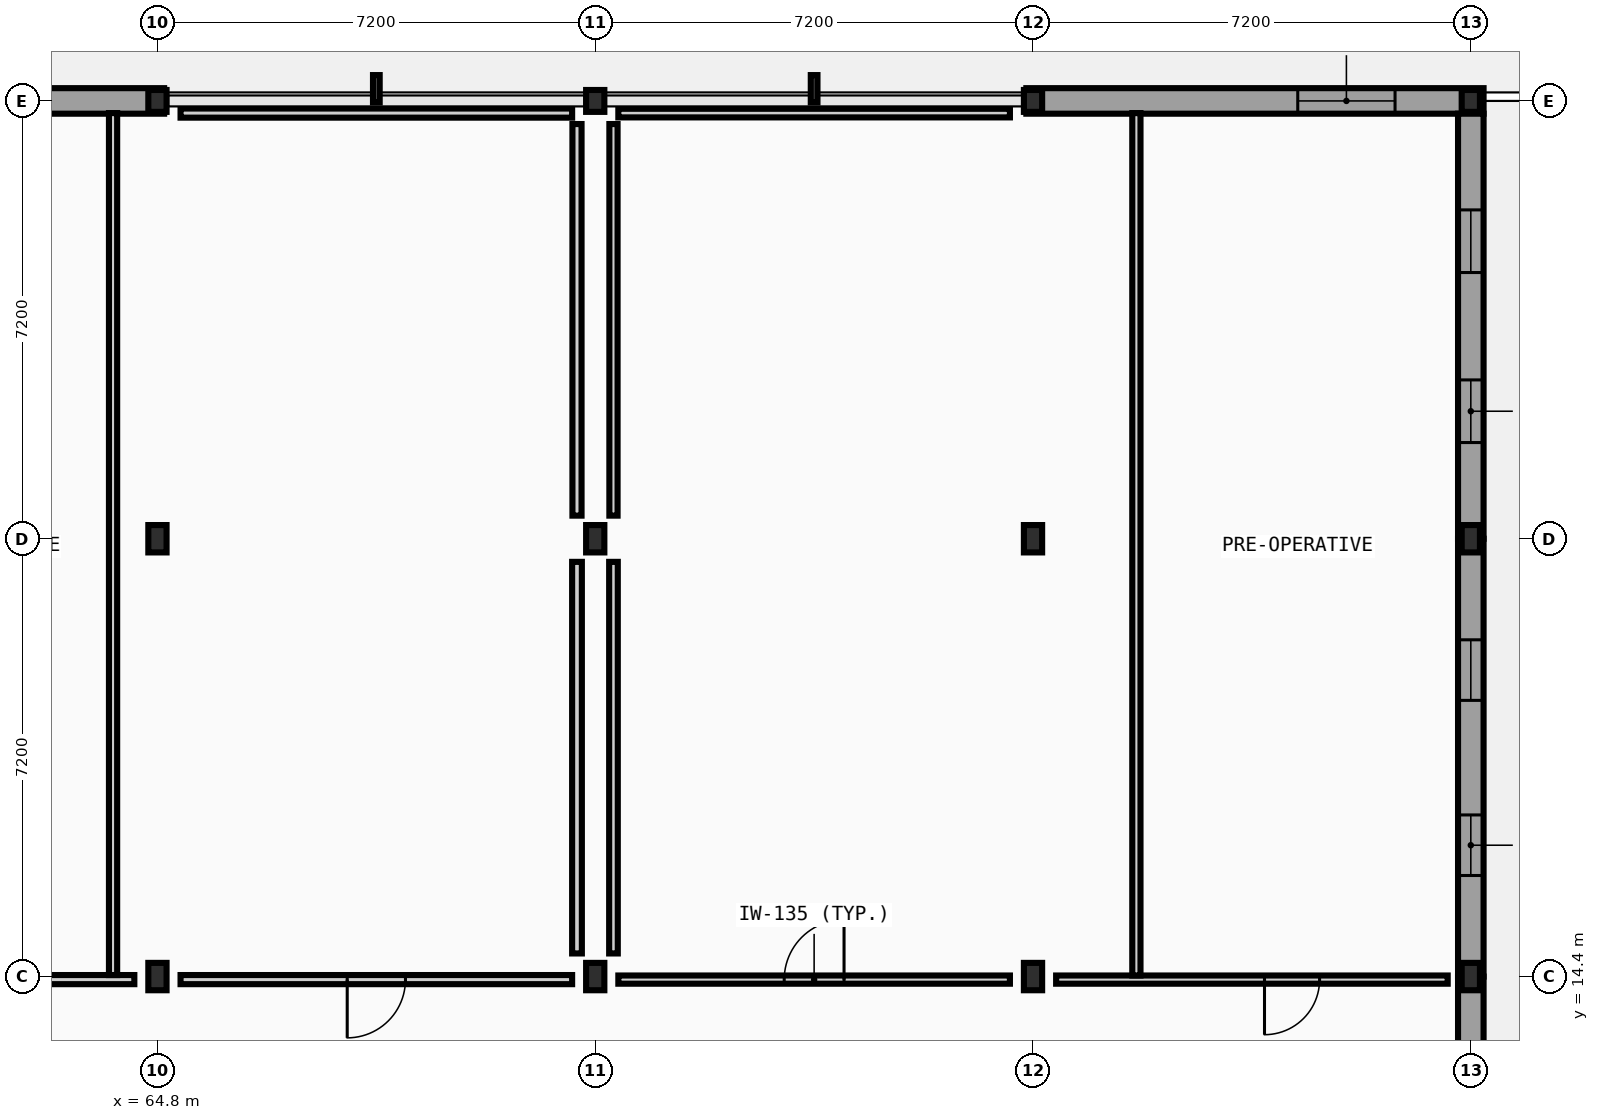
"""IFC4 building model, lengths in metres.
Left out: names, types, materials, properties, quantities, classifications, styles, units other than length and angle.
Written with IfcOpenShell. Run it as: python <this file> out.ifc"""

import sys

from ifc_helpers import new_model, si_unit, direction, frame, frame_2d, origin, origin_2d, place, context, subcontext, project, spatial, rectangle, i_section, extrude, element, fill, save


model = new_model("IFC4")
c1 = context("Model", 3, precision=1e-05, world=origin(), true_north=direction((0.0, 1.0)))
c2 = subcontext(c1, "Body", "Model", "MODEL_VIEW")
j1 = project(units=[si_unit("LENGTHUNIT", "METRE"), si_unit("PLANEANGLEUNIT", "RADIAN")], contexts=[c1])
p1 = place(None, origin())
s1 = spatial("IfcSite", under=j1, at=p1, CompositionType="ELEMENT")
p2 = place(p1, origin())
s2 = spatial("IfcBuilding", under=s1, at=p2, CompositionType="ELEMENT")
p3 = place(p2, origin())
s3 = spatial("IfcBuildingStorey", under=s2, at=p3, CompositionType="ELEMENT", Elevation=0.0)
for number, where, z_axis, x_axis in (
    (1, (64.8, 14.4, 0.0), (0.0, 0.0, 1.0), (1.0, 0.0, 0.0)),
    (2, (64.8, 21.6, 0.0), (0.0, 0.0, 1.0), (1.0, 0.0, 0.0)),
):
    element("IfcColumn", number, at=place(p3, frame(where, z_axis=z_axis, x_axis=x_axis)), inside=s3, PredefinedType="COLUMN", context=c2, shape_type="SweptSolid", body=[
        extrude(i_section(OverallWidth=0.3, OverallDepth=0.45, WebThickness=0.014, FlangeThickness=0.026, FilletRadius=0.027, at=origin_2d()), origin(), (0.0, 0.0, 1.0), 5.2),
    ])
p4 = place(p3, frame((64.8, 28.8, 0.0), z_axis=(0.0, 0.0, 1.0), x_axis=(1.0, 0.0, 0.0)))
e3 = element("IfcColumn", 3, at=p4, inside=s3, PredefinedType="COLUMN", context=c2, shape_type="SweptSolid", body=[
    extrude(i_section(OverallWidth=0.3, OverallDepth=0.36, WebThickness=0.012, FlangeThickness=0.022, FilletRadius=0.027, at=origin_2d()), origin(), (0.0, 0.0, 1.0), 5.2),
])
for number, where, z_axis, x_axis in (
    (4, (72.0, 14.4, 0.0), (0.0, 0.0, 1.0), (1.0, 0.0, 0.0)),
    (5, (72.0, 21.6, 0.0), (0.0, 0.0, 1.0), (1.0, 0.0, 0.0)),
):
    element("IfcColumn", number, at=place(p3, frame(where, z_axis=z_axis, x_axis=x_axis)), inside=s3, PredefinedType="COLUMN", context=c2, shape_type="SweptSolid", body=[
        extrude(i_section(OverallWidth=0.3, OverallDepth=0.45, WebThickness=0.014, FlangeThickness=0.026, FilletRadius=0.027, at=origin_2d()), origin(), (0.0, 0.0, 1.0), 5.2),
    ])
p5 = place(p3, frame((72.0, 28.8, 0.0), z_axis=(0.0, 0.0, 1.0), x_axis=(1.0, 0.0, 0.0)))
e6 = element("IfcColumn", 6, at=p5, inside=s3, PredefinedType="COLUMN", context=c2, shape_type="SweptSolid", body=[
    extrude(i_section(OverallWidth=0.3, OverallDepth=0.36, WebThickness=0.012, FlangeThickness=0.022, FilletRadius=0.027, at=origin_2d()), origin(), (0.0, 0.0, 1.0), 5.2),
])
for number, where, z_axis, x_axis in (
    (7, (79.2, 14.4, 0.0), (0.0, 0.0, 1.0), (1.0, 0.0, 0.0)),
    (8, (79.2, 21.6, 0.0), (0.0, 0.0, 1.0), (1.0, 0.0, 0.0)),
):
    element("IfcColumn", number, at=place(p3, frame(where, z_axis=z_axis, x_axis=x_axis)), inside=s3, PredefinedType="COLUMN", context=c2, shape_type="SweptSolid", body=[
        extrude(i_section(OverallWidth=0.3, OverallDepth=0.45, WebThickness=0.014, FlangeThickness=0.026, FilletRadius=0.027, at=origin_2d()), origin(), (0.0, 0.0, 1.0), 5.2),
    ])
p6 = place(p3, frame((79.2, 28.8, 0.0), z_axis=(0.0, 0.0, 1.0), x_axis=(1.0, 0.0, 0.0)))
e9 = element("IfcColumn", 9, at=p6, inside=s3, PredefinedType="COLUMN", context=c2, shape_type="SweptSolid", body=[
    extrude(i_section(OverallWidth=0.3, OverallDepth=0.36, WebThickness=0.012, FlangeThickness=0.022, FilletRadius=0.027, at=origin_2d()), origin(), (0.0, 0.0, 1.0), 5.2),
])
for number, where, z_axis, x_axis in (
    (10, (86.4, 14.4, 0.0), (0.0, 0.0, 1.0), (1.0, 0.0, 0.0)),
    (11, (86.4, 21.6, 0.0), (0.0, 0.0, 1.0), (1.0, 0.0, 0.0)),
):
    element("IfcColumn", number, at=place(p3, frame(where, z_axis=z_axis, x_axis=x_axis)), inside=s3, PredefinedType="COLUMN", context=c2, shape_type="SweptSolid", body=[
        extrude(i_section(OverallWidth=0.3, OverallDepth=0.45, WebThickness=0.014, FlangeThickness=0.026, FilletRadius=0.027, at=origin_2d()), origin(), (0.0, 0.0, 1.0), 5.2),
    ])
p7 = place(p3, frame((86.4, 28.8, 0.0), z_axis=(0.0, 0.0, 1.0), x_axis=(1.0, 0.0, 0.0)))
e12 = element("IfcColumn", 12, at=p7, inside=s3, PredefinedType="COLUMN", context=c2, shape_type="SweptSolid", body=[
    extrude(i_section(OverallWidth=0.3, OverallDepth=0.36, WebThickness=0.012, FlangeThickness=0.022, FilletRadius=0.027, at=origin_2d()), origin(), (0.0, 0.0, 1.0), 5.2),
])
p8 = place(p3, frame((64.91, 28.8, 0.0), z_axis=(0.0, 0.0, 1.0), x_axis=(-1.0, 0.0, 0.0)))
e13 = element("IfcWall", 13, at=p8, inside=s3, PredefinedType="STANDARD", context=c2, shape_type="SweptSolid", body=[
    extrude(rectangle(XDim=6.38, YDim=0.42, at=frame_2d((3.19, 0.0))), origin(), (0.0, 0.0, 1.0), 4.665),
])
p9 = place(p3, frame((86.61, 28.8, 0.0), z_axis=(0.0, 0.0, 1.0), x_axis=(-1.0, 0.0, 0.0)))
e14 = element("IfcWall", 14, at=p9, inside=s3, PredefinedType="STANDARD", context=c2, shape_type="SweptSolid", body=[
    extrude(rectangle(XDim=7.52, YDim=0.42, at=frame_2d((3.76, 0.0))), origin(), (0.0, 0.0, 1.0), 4.665),
])
p10 = place(p9, frame((1.456, 0.0, 1.2)))
e15 = element("IfcOpeningElement", 15, at=p10, cuts=e14, PredefinedType="OPENING", context=c2, shape_type="SweptSolid", body=[
    extrude(rectangle(XDim=1.6, YDim=1.4, at=frame_2d((0.8, 0.7))), frame((0.0, 0.22, 0.0), z_axis=(0.0, -1.0, 0.0), x_axis=(1.0, 0.0, 0.0)), (0.0, 0.0, 1.0), 0.44),
])
p11 = place(p3, frame((86.4, 8.9, 0.0), z_axis=(0.0, 0.0, 1.0), x_axis=(0.0, 1.0, 0.0)))
e16 = element("IfcWall", 16, at=p11, inside=s3, PredefinedType="STANDARD", context=c2, shape_type="SweptSolid", body=[
    extrude(rectangle(XDim=5.5, YDim=0.42, at=frame_2d((2.75, 0.0))), origin(), (0.0, 0.0, 1.0), 4.97),
])
p12 = place(p3, frame((86.4, 14.4, 0.0), z_axis=(0.0, 0.0, 1.0), x_axis=(0.0, 1.0, 0.0)))
e17 = element("IfcWall", 17, at=p12, inside=s3, PredefinedType="STANDARD", context=c2, shape_type="SweptSolid", body=[
    extrude(rectangle(XDim=7.2, YDim=0.42, at=frame_2d((3.6, 0.0))), origin(), (0.0, 0.0, 1.0), 4.595),
])
p13 = place(p12, frame((1.662, 0.0, 0.95)))
e18 = element("IfcOpeningElement", 18, at=p13, cuts=e17, PredefinedType="OPENING", context=c2, shape_type="SweptSolid", body=[
    extrude(rectangle(XDim=0.996, YDim=1.26, at=frame_2d((0.498, 0.63))), frame((0.0, 0.22, 0.0), z_axis=(0.0, -1.0, 0.0), x_axis=(1.0, 0.0, 0.0)), (0.0, 0.0, 1.0), 0.44),
])
p14 = place(p12, frame((4.542, 0.0, 0.95)))
e19 = element("IfcOpeningElement", 19, at=p14, cuts=e17, PredefinedType="OPENING", context=c2, shape_type="SweptSolid", body=[
    extrude(rectangle(XDim=0.996, YDim=1.26, at=frame_2d((0.498, 0.63))), frame((0.0, 0.22, 0.0), z_axis=(0.0, -1.0, 0.0), x_axis=(1.0, 0.0, 0.0)), (0.0, 0.0, 1.0), 0.44),
])
p15 = place(p3, frame((86.4, 21.6, 0.0), z_axis=(0.0, 0.0, 1.0), x_axis=(0.0, 1.0, 0.0)))
e20 = element("IfcWall", 20, at=p15, inside=s3, PredefinedType="STANDARD", context=c2, shape_type="SweptSolid", body=[
    extrude(rectangle(XDim=6.99, YDim=0.42, at=frame_2d((3.495, 0.0))), origin(), (0.0, 0.0, 1.0), 4.595),
])
p16 = place(p15, frame((1.582, 0.0, 0.95)))
e21 = element("IfcOpeningElement", 21, at=p16, cuts=e20, PredefinedType="OPENING", context=c2, shape_type="SweptSolid", body=[
    extrude(rectangle(XDim=1.03, YDim=1.26, at=frame_2d((0.515, 0.63))), frame((0.0, 0.22, 0.0), z_axis=(0.0, -1.0, 0.0), x_axis=(1.0, 0.0, 0.0)), (0.0, 0.0, 1.0), 0.44),
])
p17 = place(p15, frame((4.378, 0.0, 0.95)))
e22 = element("IfcOpeningElement", 22, at=p17, cuts=e20, PredefinedType="OPENING", context=c2, shape_type="SweptSolid", body=[
    extrude(rectangle(XDim=1.03, YDim=1.26, at=frame_2d((0.515, 0.63))), frame((0.0, 0.22, 0.0), z_axis=(0.0, -1.0, 0.0), x_axis=(1.0, 0.0, 0.0)), (0.0, 0.0, 1.0), 0.44),
])
p18 = place(p3, frame((58.7, 14.35, 0.0), z_axis=(0.0, 0.0, 1.0), x_axis=(1.0, 0.0, 0.0)))
e23 = element("IfcWall", 23, at=p18, inside=s3, PredefinedType="PARTITIONING", context=c2, shape_type="SweptSolid", body=[
    extrude(rectangle(XDim=5.72, YDim=0.15, at=frame_2d((2.86, 0.0))), origin(), (0.0, 0.0, 1.0), 4.665),
])
p19 = place(p18, frame((2.219, 0.0, 0.0)))
e24 = element("IfcOpeningElement", 24, at=p19, cuts=e23, PredefinedType="OPENING", context=c2, shape_type="SweptSolid", body=[
    extrude(rectangle(XDim=0.932, YDim=2.096, at=frame_2d((0.466, 1.048))), frame((0.0, 0.085, 0.0), z_axis=(0.0, -1.0, 0.0), x_axis=(1.0, 0.0, 0.0)), (0.0, 0.0, 1.0), 0.17),
])
p20 = place(p3, frame((65.18, 14.35, 0.0), z_axis=(0.0, 0.0, 1.0), x_axis=(1.0, 0.0, 0.0)))
e25 = element("IfcWall", 25, at=p20, inside=s3, PredefinedType="PARTITIONING", context=c2, shape_type="SweptSolid", body=[
    extrude(rectangle(XDim=6.44, YDim=0.15, at=frame_2d((3.22, 0.0))), origin(), (0.0, 0.0, 1.0), 4.665),
])
p21 = place(p20, frame((2.741, 0.0, 0.0)))
e26 = element("IfcOpeningElement", 26, at=p21, cuts=e25, PredefinedType="OPENING", context=c2, shape_type="SweptSolid", body=[
    extrude(rectangle(XDim=0.958, YDim=2.096, at=frame_2d((0.479, 1.048))), frame((0.0, 0.085, 0.0), z_axis=(0.0, -1.0, 0.0), x_axis=(1.0, 0.0, 0.0)), (0.0, 0.0, 1.0), 0.17),
])
p22 = place(p3, frame((72.38, 14.35, 0.0), z_axis=(0.0, 0.0, 1.0), x_axis=(1.0, 0.0, 0.0)))
e27 = element("IfcWall", 27, at=p22, inside=s3, PredefinedType="PARTITIONING", context=c2, shape_type="SweptSolid", body=[
    extrude(rectangle(XDim=6.44, YDim=0.135, at=frame_2d((3.22, 0.0))), origin(), (0.0, 0.0, 1.0), 4.665),
])
p23 = place(p22, frame((2.728, 0.0, 0.0)))
e28 = element("IfcOpeningElement", 28, at=p23, cuts=e27, PredefinedType="OPENING", context=c2, shape_type="SweptSolid", body=[
    extrude(rectangle(XDim=0.984, YDim=2.096, at=frame_2d((0.492, 1.048))), frame((0.0, 0.078, 0.0), z_axis=(0.0, -1.0, 0.0), x_axis=(1.0, 0.0, 0.0)), (0.0, 0.0, 1.0), 0.155),
])
p24 = place(p3, frame((79.58, 14.35, 0.0), z_axis=(0.0, 0.0, 1.0), x_axis=(1.0, 0.0, 0.0)))
e29 = element("IfcWall", 29, at=p24, inside=s3, PredefinedType="PARTITIONING", context=c2, shape_type="SweptSolid", body=[
    extrude(rectangle(XDim=6.44, YDim=0.135, at=frame_2d((3.22, 0.0))), origin(), (0.0, 0.0, 1.0), 4.665),
])
p25 = place(p24, frame((3.427, 0.0, 0.0)))
e30 = element("IfcOpeningElement", 30, at=p25, cuts=e29, PredefinedType="OPENING", context=c2, shape_type="SweptSolid", body=[
    extrude(rectangle(XDim=0.906, YDim=2.096, at=frame_2d((0.453, 1.048))), frame((0.0, 0.078, 0.0), z_axis=(0.0, -1.0, 0.0), x_axis=(1.0, 0.0, 0.0)), (0.0, 0.0, 1.0), 0.155),
])
p26 = place(p3, frame((65.18, 28.6, 0.0), z_axis=(0.0, 0.0, 1.0), x_axis=(1.0, 0.0, 0.0)))
e31 = element("IfcWall", 31, at=p26, inside=s3, PredefinedType="PARTITIONING", context=c2, shape_type="SweptSolid", body=[
    extrude(rectangle(XDim=6.44, YDim=0.15, at=frame_2d((3.22, 0.0))), origin(), (0.0, 0.0, 1.0), 4.665),
])
p27 = place(p3, frame((72.38, 28.6, 0.0), z_axis=(0.0, 0.0, 1.0), x_axis=(1.0, 0.0, 0.0)))
e32 = element("IfcWall", 32, at=p27, inside=s3, PredefinedType="PARTITIONING", context=c2, shape_type="SweptSolid", body=[
    extrude(rectangle(XDim=6.44, YDim=0.142, at=frame_2d((3.22, 0.0))), origin(), (0.0, 0.0, 1.0), 4.665),
])
p28 = place(p3, frame((64.07, 14.425, 0.0), z_axis=(0.0, 0.0, 1.0), x_axis=(0.0, 1.0, 0.0)))
e33 = element("IfcWall", 33, at=p28, inside=s3, PredefinedType="PARTITIONING", context=c2, shape_type="SweptSolid", body=[
    extrude(rectangle(XDim=14.175, YDim=0.135, at=frame_2d((7.087, 0.0))), origin(), (0.0, 0.0, 1.0), 4.97),
])
p29 = place(p3, frame((71.7, 14.78, 0.0), z_axis=(0.0, 0.0, 1.0), x_axis=(0.0, 1.0, 0.0)))
e34 = element("IfcWall", 34, at=p29, inside=s3, PredefinedType="PARTITIONING", context=c2, shape_type="SweptSolid", body=[
    extrude(rectangle(XDim=6.44, YDim=0.16, at=frame_2d((3.22, 0.0))), origin(), (0.0, 0.0, 1.0), 4.665),
])
p30 = place(p3, frame((71.7, 21.98, 0.0), z_axis=(0.0, 0.0, 1.0), x_axis=(0.0, 1.0, 0.0)))
e35 = element("IfcWall", 35, at=p30, inside=s3, PredefinedType="PARTITIONING", context=c2, shape_type="SweptSolid", body=[
    extrude(rectangle(XDim=6.44, YDim=0.15, at=frame_2d((3.22, 0.0))), origin(), (0.0, 0.0, 1.0), 4.665),
])
p31 = place(p3, frame((72.3, 14.78, 0.0), z_axis=(0.0, 0.0, 1.0), x_axis=(0.0, 1.0, 0.0)))
e36 = element("IfcWall", 36, at=p31, inside=s3, PredefinedType="PARTITIONING", context=c2, shape_type="SweptSolid", body=[
    extrude(rectangle(XDim=6.44, YDim=0.142, at=frame_2d((3.22, 0.0))), origin(), (0.0, 0.0, 1.0), 4.665),
])
p32 = place(p3, frame((72.3, 21.98, 0.0), z_axis=(0.0, 0.0, 1.0), x_axis=(0.0, 1.0, 0.0)))
e37 = element("IfcWall", 37, at=p32, inside=s3, PredefinedType="PARTITIONING", context=c2, shape_type="SweptSolid", body=[
    extrude(rectangle(XDim=6.44, YDim=0.135, at=frame_2d((3.22, 0.0))), origin(), (0.0, 0.0, 1.0), 4.97),
])
p33 = place(p3, frame((80.9, 14.417, 0.0), z_axis=(0.0, 0.0, 1.0), x_axis=(0.0, 1.0, 0.0)))
e38 = element("IfcWall", 38, at=p33, inside=s3, PredefinedType="PARTITIONING", context=c2, shape_type="SweptSolid", body=[
    extrude(rectangle(XDim=14.183, YDim=0.135, at=frame_2d((7.091, 0.0))), origin(), (0.0, 0.0, 1.0), 4.97),
])
p34 = place(p10, origin())
e39 = element("IfcWindow", 39, at=p34, inside=s3, PartitioningType="SINGLE_PANEL", PredefinedType="WINDOW", context=c2, shape_type="SweptSolid", body=[
    extrude(rectangle(XDim=1.6, YDim=1.4, at=frame_2d((0.8, 0.7))), frame((0.0, 0.03, 0.0), z_axis=(0.0, -1.0, 0.0), x_axis=(1.0, 0.0, 0.0)), (0.0, 0.0, 1.0), 0.06),
])
fill(e15, e39)
p35 = place(p13, origin())
e40 = element("IfcWindow", 40, at=p35, inside=s3, PartitioningType="SINGLE_PANEL", PredefinedType="WINDOW", context=c2, shape_type="SweptSolid", body=[
    extrude(rectangle(XDim=0.996, YDim=1.26, at=frame_2d((0.498, 0.63))), frame((0.0, 0.03, 0.0), z_axis=(0.0, -1.0, 0.0), x_axis=(1.0, 0.0, 0.0)), (0.0, 0.0, 1.0), 0.06),
])
fill(e18, e40)
p36 = place(p14, origin())
e41 = element("IfcWindow", 41, at=p36, inside=s3, PartitioningType="SINGLE_PANEL", PredefinedType="WINDOW", context=c2, shape_type="SweptSolid", body=[
    extrude(rectangle(XDim=0.996, YDim=1.26, at=frame_2d((0.498, 0.63))), frame((0.0, 0.03, 0.0), z_axis=(0.0, -1.0, 0.0), x_axis=(1.0, 0.0, 0.0)), (0.0, 0.0, 1.0), 0.06),
])
fill(e19, e41)
p37 = place(p16, origin())
e42 = element("IfcWindow", 42, at=p37, inside=s3, PartitioningType="SINGLE_PANEL", PredefinedType="WINDOW", context=c2, shape_type="SweptSolid", body=[
    extrude(rectangle(XDim=1.03, YDim=1.26, at=frame_2d((0.515, 0.63))), frame((0.0, 0.03, 0.0), z_axis=(0.0, -1.0, 0.0), x_axis=(1.0, 0.0, 0.0)), (0.0, 0.0, 1.0), 0.06),
])
fill(e21, e42)
p38 = place(p17, origin())
e43 = element("IfcWindow", 43, at=p38, inside=s3, PartitioningType="SINGLE_PANEL", PredefinedType="WINDOW", context=c2, shape_type="SweptSolid", body=[
    extrude(rectangle(XDim=1.03, YDim=1.26, at=frame_2d((0.515, 0.63))), frame((0.0, 0.03, 0.0), z_axis=(0.0, -1.0, 0.0), x_axis=(1.0, 0.0, 0.0)), (0.0, 0.0, 1.0), 0.06),
])
fill(e22, e43)
p39 = place(p25, frame((0.906, 0.0, 0.0), z_axis=(0.0, 0.0, 1.0), x_axis=(-1.0, 0.0, 0.0)))
e44 = element("IfcDoor", 44, at=p39, inside=s3, OperationType="SINGLE_SWING_LEFT", PredefinedType="DOOR", context=c2, shape_type="SweptSolid", body=[
    extrude(rectangle(XDim=0.906, YDim=2.096, at=frame_2d((0.453, 1.048))), frame((0.0, 0.025, 0.0), z_axis=(0.0, -1.0, 0.0), x_axis=(1.0, 0.0, 0.0)), (0.0, 0.0, 1.0), 0.05),
])
fill(e30, e44)
p40 = place(p21, frame((0.958, 0.0, 0.0), z_axis=(0.0, 0.0, 1.0), x_axis=(-1.0, 0.0, 0.0)))
e45 = element("IfcDoor", 45, at=p40, inside=s3, OperationType="SINGLE_SWING_LEFT", PredefinedType="DOOR", context=c2, shape_type="SweptSolid", body=[
    extrude(rectangle(XDim=0.958, YDim=2.096, at=frame_2d((0.479, 1.048))), frame((0.0, 0.025, 0.0), z_axis=(0.0, -1.0, 0.0), x_axis=(1.0, 0.0, 0.0)), (0.0, 0.0, 1.0), 0.05),
])
fill(e26, e45)
p41 = place(p23, frame((0.984, 0.0, 0.0), z_axis=(0.0, 0.0, 1.0), x_axis=(-1.0, 0.0, 0.0)))
e46 = element("IfcDoor", 46, at=p41, inside=s3, OperationType="SINGLE_SWING_RIGHT", PredefinedType="DOOR", context=c2, shape_type="SweptSolid", body=[
    extrude(rectangle(XDim=0.984, YDim=2.096, at=frame_2d((0.492, 1.048))), frame((0.0, 0.025, 0.0), z_axis=(0.0, -1.0, 0.0), x_axis=(1.0, 0.0, 0.0)), (0.0, 0.0, 1.0), 0.05),
])
fill(e28, e46)
save(model, sys.argv[1])
